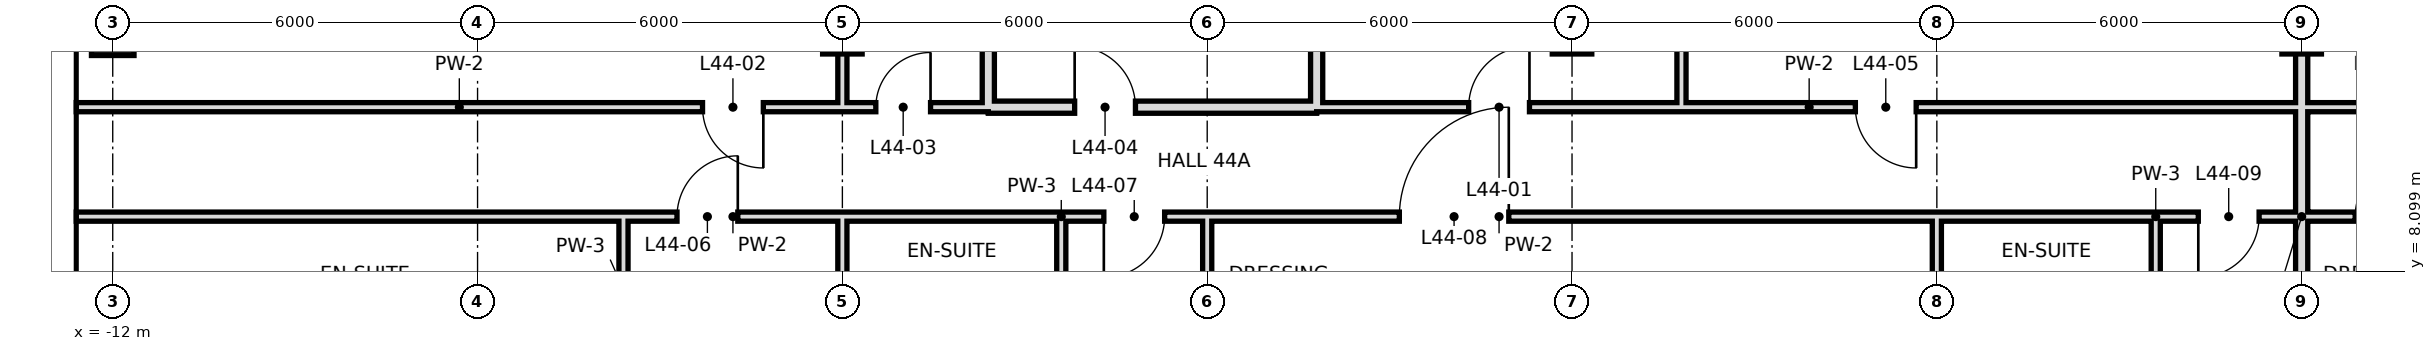
"""IFC4 building model, lengths in metres.
Left out: names, types, materials, properties, quantities, classifications, styles, units other than length and angle.
Written with IfcOpenShell. Run it as: python <this file> out.ifc"""

import sys

from ifc_helpers import new_model, si_unit, direction, frame, frame_2d, origin, origin_2d, place, context, subcontext, project, spatial, rectangle, hollow_rectangle, extrude, element, fill, save


model = new_model("IFC4")
c1 = context("Model", 3, precision=1e-05, world=origin(), true_north=direction((0.0, 1.0)))
c2 = subcontext(c1, "Body", "Model", "MODEL_VIEW")
j1 = project(units=[si_unit("LENGTHUNIT", "METRE"), si_unit("PLANEANGLEUNIT", "RADIAN")], contexts=[c1])
p1 = place(None, origin())
s1 = spatial("IfcSite", under=j1, at=p1, CompositionType="ELEMENT")
p2 = place(p1, origin())
s2 = spatial("IfcBuilding", under=s1, at=p2, CompositionType="ELEMENT")
p3 = place(p2, frame((0.0, 0.0, 192.0)))
s3 = spatial("IfcBuildingStorey", under=s2, at=p3, CompositionType="ELEMENT", Elevation=192.0)
p4 = place(p3, frame((-12.0, 12.0, -0.3), z_axis=(0.0, 0.0, 1.0), x_axis=(1.0, 0.0, 0.0)))
e1 = element("IfcColumn", 1, at=p4, inside=s3, PredefinedType="COLUMN", context=c2, shape_type="SweptSolid", body=[
    extrude(hollow_rectangle(XDim=0.7, YDim=0.7, WallThickness=0.036, at=origin_2d()), origin(), (0.0, 0.0, 1.0), 3.9),
])
for number, where, z_axis, x_axis in (
    (2, (0.0, 12.0, 0.0), (0.0, 0.0, 1.0), (1.0, 0.0, 0.0)),
    (3, (12.0, 12.0, 0.0), (0.0, 0.0, 1.0), (1.0, 0.0, 0.0)),
    (4, (24.0, 12.0, 0.0), (0.0, 0.0, 1.0), (1.0, 0.0, 0.0)),
):
    element("IfcColumn", number, at=place(p3, frame(where, z_axis=z_axis, x_axis=x_axis)), inside=s3, PredefinedType="COLUMN", context=c2, shape_type="SweptSolid", body=[
        extrude(hollow_rectangle(XDim=0.65, YDim=0.65, WallThickness=0.032, at=origin_2d()), origin(), (0.0, 0.0, 1.0), 3.6),
    ])
p5 = place(p3, frame((-3.6, 6.0, 0.0), z_axis=(0.0, 0.0, 1.0), x_axis=(0.0, 1.0, 0.0)))
e5 = element("IfcWall", 5, at=p5, inside=s3, PredefinedType="PARTITIONING", context=c2, shape_type="SweptSolid", body=[
    extrude(rectangle(XDim=3.0, YDim=0.15, at=frame_2d((1.5, 0.0))), origin(), (0.0, 0.0, 1.0), 3.42),
])
p6 = place(p3, frame((0.0, 6.0, 0.0), z_axis=(0.0, 0.0, 1.0), x_axis=(0.0, 1.0, 0.0)))
e6 = element("IfcWall", 6, at=p6, inside=s3, PredefinedType="PARTITIONING", context=c2, shape_type="SweptSolid", body=[
    extrude(rectangle(XDim=3.0, YDim=0.15, at=frame_2d((1.5, 0.0))), origin(), (0.0, 0.0, 1.0), 2.72),
])
p7 = place(p3, frame((0.0, 10.8, 0.0), z_axis=(0.0, 0.0, 1.0), x_axis=(0.0, 1.0, 0.0)))
e7 = element("IfcWall", 7, at=p7, inside=s3, PredefinedType="PARTITIONING", context=c2, shape_type="SweptSolid", body=[
    extrude(rectangle(XDim=7.2, YDim=0.15, at=frame_2d((3.6, 0.0))), origin(), (0.0, 0.0, 1.0), 2.72),
])
p8 = place(p3, frame((13.8, 10.8, 0.0), z_axis=(0.0, 0.0, 1.0), x_axis=(0.0, 1.0, 0.0)))
e8 = element("IfcWall", 8, at=p8, inside=s3, PredefinedType="PARTITIONING", context=c2, shape_type="SweptSolid", body=[
    extrude(rectangle(XDim=4.5, YDim=0.15, at=frame_2d((2.25, 0.0))), origin(), (0.0, 0.0, 1.0), 3.42),
])
p9 = place(p3, frame((18.0, 6.0, 0.0), z_axis=(0.0, 0.0, 1.0), x_axis=(0.0, 1.0, 0.0)))
e9 = element("IfcWall", 9, at=p9, inside=s3, PredefinedType="PARTITIONING", context=c2, shape_type="SweptSolid", body=[
    extrude(rectangle(XDim=3.0, YDim=0.15, at=frame_2d((1.5, 0.0))), origin(), (0.0, 0.0, 1.0), 2.72),
])
p10 = place(p3, frame((2.4, 10.8, 0.0), z_axis=(0.0, 0.0, 1.0), x_axis=(0.0, 1.0, 0.0)))
e10 = element("IfcWall", 10, at=p10, inside=s3, PredefinedType="SOLIDWALL", context=c2, shape_type="SweptSolid", body=[
    extrude(rectangle(XDim=7.2, YDim=0.2, at=frame_2d((3.6, 0.0))), origin(), (0.0, 0.0, 1.0), 2.72),
])
p11 = place(p3, frame((21.6, 6.0, 0.0), z_axis=(0.0, 0.0, 1.0), x_axis=(0.0, 1.0, 0.0)))
e11 = element("IfcWall", 11, at=p11, inside=s3, PredefinedType="PARTITIONING", context=c2, shape_type="SweptSolid", body=[
    extrude(rectangle(XDim=3.0, YDim=0.15, at=frame_2d((1.5, 0.0))), origin(), (0.0, 0.0, 1.0), 3.42),
])
p12 = place(p3, frame((24.0, 0.0, 0.0), z_axis=(0.0, 0.0, 1.0), x_axis=(0.0, 1.0, 0.0)))
e12 = element("IfcWall", 12, at=p12, inside=s3, PredefinedType="SOLIDWALL", context=c2, shape_type="SweptSolid", body=[
    extrude(rectangle(XDim=15.3, YDim=0.2, at=frame_2d((7.65, 0.0))), origin(), (0.0, 0.0, 1.0), 2.72),
])
p13 = place(p3, frame((3.6, 6.0, 0.0), z_axis=(0.0, 0.0, 1.0), x_axis=(0.0, 1.0, 0.0)))
e13 = element("IfcWall", 13, at=p13, inside=s3, PredefinedType="PARTITIONING", context=c2, shape_type="SweptSolid", body=[
    extrude(rectangle(XDim=3.0, YDim=0.15, at=frame_2d((1.5, 0.0))), origin(), (0.0, 0.0, 1.0), 3.42),
])
p14 = place(p3, frame((6.0, -0.6, 0.0), z_axis=(0.0, 0.0, 1.0), x_axis=(0.0, 1.0, 0.0)))
e14 = element("IfcWall", 14, at=p14, inside=s3, PredefinedType="PARTITIONING", context=c2, shape_type="SweptSolid", body=[
    extrude(rectangle(XDim=9.6, YDim=0.15, at=frame_2d((4.8, 0.0))), origin(), (0.0, 0.0, 1.0), 2.72),
])
p15 = place(p3, frame((7.8, 10.8, 0.0), z_axis=(0.0, 0.0, 1.0), x_axis=(0.0, 1.0, 0.0)))
e15 = element("IfcWall", 15, at=p15, inside=s3, PredefinedType="SOLIDWALL", context=c2, shape_type="SweptSolid", body=[
    extrude(rectangle(XDim=4.5, YDim=0.2, at=frame_2d((2.25, 0.0))), origin(), (0.0, 0.0, 1.0), 2.72),
])
p16 = place(p3, frame((2.4, 10.8, 0.0), z_axis=(0.0, 0.0, 1.0), x_axis=(1.0, 0.0, 0.0)))
e16 = element("IfcWall", 16, at=p16, inside=s3, PredefinedType="SOLIDWALL", context=c2, shape_type="SweptSolid", body=[
    extrude(rectangle(XDim=5.4, YDim=0.2, at=frame_2d((2.7, 0.0))), origin(), (0.0, 0.0, 1.0), 2.72),
])
p17 = place(p16, frame((1.42, 0.0, 0.0)))
e17 = element("IfcOpeningElement", 17, at=p17, cuts=e16, PredefinedType="OPENING", context=c2, shape_type="SweptSolid", body=[
    extrude(rectangle(XDim=1.0, YDim=2.4, at=frame_2d((0.5, 1.2))), frame((0.0, 0.11, 0.0), z_axis=(0.0, -1.0, 0.0), x_axis=(1.0, 0.0, 0.0)), (0.0, 0.0, 1.0), 0.22),
])
p18 = place(p3, frame((-12.6, 10.8, 0.0), z_axis=(0.0, 0.0, 1.0), x_axis=(1.0, 0.0, 0.0)))
e18 = element("IfcWall", 18, at=p18, inside=s3, PredefinedType="PARTITIONING", context=c2, shape_type="SweptSolid", body=[
    extrude(rectangle(XDim=12.6, YDim=0.15, at=frame_2d((6.3, 0.0))), origin(), (0.0, 0.0, 1.0), 3.42),
])
p19 = place(p18, frame((10.3, 0.0, 0.0)))
e19 = element("IfcOpeningElement", 19, at=p19, cuts=e18, PredefinedType="OPENING", context=c2, shape_type="SweptSolid", body=[
    extrude(rectangle(XDim=1.0, YDim=2.4, at=frame_2d((0.5, 1.2))), frame((0.0, 0.085, 0.0), z_axis=(0.0, -1.0, 0.0), x_axis=(1.0, 0.0, 0.0)), (0.0, 0.0, 1.0), 0.17),
])
p20 = place(p3, frame((7.8, 10.8, 0.0), z_axis=(0.0, 0.0, 1.0), x_axis=(1.0, 0.0, 0.0)))
e20 = element("IfcWall", 20, at=p20, inside=s3, PredefinedType="PARTITIONING", context=c2, shape_type="SweptSolid", body=[
    extrude(rectangle(XDim=16.2, YDim=0.15, at=frame_2d((8.1, 0.0))), origin(), (0.0, 0.0, 1.0), 3.42),
])
p21 = place(p20, frame((2.5, 0.0, 0.0)))
e21 = element("IfcOpeningElement", 21, at=p21, cuts=e20, PredefinedType="OPENING", context=c2, shape_type="SweptSolid", body=[
    extrude(rectangle(XDim=1.0, YDim=2.4, at=frame_2d((0.5, 1.2))), frame((0.0, 0.085, 0.0), z_axis=(0.0, -1.0, 0.0), x_axis=(1.0, 0.0, 0.0)), (0.0, 0.0, 1.0), 0.17),
])
p22 = place(p20, frame((8.86, 0.0, 0.0)))
e22 = element("IfcOpeningElement", 22, at=p22, cuts=e20, PredefinedType="OPENING", context=c2, shape_type="SweptSolid", body=[
    extrude(rectangle(XDim=1.0, YDim=2.4, at=frame_2d((0.5, 1.2))), frame((0.0, 0.085, 0.0), z_axis=(0.0, -1.0, 0.0), x_axis=(1.0, 0.0, 0.0)), (0.0, 0.0, 1.0), 0.17),
])
p23 = place(p3, frame((0.0, 10.8, 0.0), z_axis=(0.0, 0.0, 1.0), x_axis=(1.0, 0.0, 0.0)))
e23 = element("IfcWall", 23, at=p23, inside=s3, PredefinedType="PARTITIONING", context=c2, shape_type="SweptSolid", body=[
    extrude(rectangle(XDim=2.4, YDim=0.15, at=frame_2d((1.2, 0.0))), origin(), (0.0, 0.0, 1.0), 3.42),
])
p24 = place(p23, frame((0.55, 0.0, 0.0)))
e24 = element("IfcOpeningElement", 24, at=p24, cuts=e23, PredefinedType="OPENING", context=c2, shape_type="SweptSolid", body=[
    extrude(rectangle(XDim=0.9, YDim=2.4, at=frame_2d((0.45, 1.2))), frame((0.0, 0.085, 0.0), z_axis=(0.0, -1.0, 0.0), x_axis=(1.0, 0.0, 0.0)), (0.0, 0.0, 1.0), 0.17),
])
p25 = place(p3, frame((24.0, 10.8, 0.0), z_axis=(0.0, 0.0, 1.0), x_axis=(1.0, 0.0, 0.0)))
e25 = element("IfcWall", 25, at=p25, inside=s3, PredefinedType="PARTITIONING", context=c2, shape_type="SweptSolid", body=[
    extrude(rectangle(XDim=2.4, YDim=0.15, at=frame_2d((1.2, 0.0))), origin(), (0.0, 0.0, 1.0), 3.42),
])
p26 = place(p25, frame((0.95, 0.0, 0.0)))
e26 = element("IfcOpeningElement", 26, at=p26, cuts=e25, PredefinedType="OPENING", context=c2, shape_type="SweptSolid", body=[
    extrude(rectangle(XDim=0.9, YDim=2.4, at=frame_2d((0.45, 1.2))), frame((0.0, 0.085, 0.0), z_axis=(0.0, -1.0, 0.0), x_axis=(1.0, 0.0, 0.0)), (0.0, 0.0, 1.0), 0.17),
])
p27 = place(p3, frame((-3.6, 9.0, 0.0), z_axis=(0.0, 0.0, 1.0), x_axis=(1.0, 0.0, 0.0)))
e27 = element("IfcWall", 27, at=p27, inside=s3, PredefinedType="PARTITIONING", context=c2, shape_type="SweptSolid", body=[
    extrude(rectangle(XDim=3.6, YDim=0.15, at=frame_2d((1.8, 0.0))), origin(), (0.0, 0.0, 1.0), 3.42),
])
p28 = place(p27, frame((0.88, 0.0, 0.0)))
e28 = element("IfcOpeningElement", 28, at=p28, cuts=e27, PredefinedType="OPENING", context=c2, shape_type="SweptSolid", body=[
    extrude(rectangle(XDim=1.0, YDim=2.4, at=frame_2d((0.5, 1.2))), frame((0.0, 0.085, 0.0), z_axis=(0.0, -1.0, 0.0), x_axis=(1.0, 0.0, 0.0)), (0.0, 0.0, 1.0), 0.17),
])
p29 = place(p3, frame((3.6, 9.0, 0.0), z_axis=(0.0, 0.0, 1.0), x_axis=(1.0, 0.0, 0.0)))
e29 = element("IfcWall", 29, at=p29, inside=s3, PredefinedType="PARTITIONING", context=c2, shape_type="SweptSolid", body=[
    extrude(rectangle(XDim=14.4, YDim=0.15, at=frame_2d((7.2, 0.0))), origin(), (0.0, 0.0, 1.0), 3.42),
])
p30 = place(p29, frame((0.7, 0.0, 0.0)))
e30 = element("IfcOpeningElement", 30, at=p30, cuts=e29, PredefinedType="OPENING", context=c2, shape_type="SweptSolid", body=[
    extrude(rectangle(XDim=1.0, YDim=2.4, at=frame_2d((0.5, 1.2))), frame((0.0, 0.085, 0.0), z_axis=(0.0, -1.0, 0.0), x_axis=(1.0, 0.0, 0.0)), (0.0, 0.0, 1.0), 0.17),
])
p31 = place(p29, frame((5.56, 0.0, 0.0)))
e31 = element("IfcOpeningElement", 31, at=p31, cuts=e29, PredefinedType="OPENING", context=c2, shape_type="SweptSolid", body=[
    extrude(rectangle(XDim=1.8, YDim=2.4, at=frame_2d((0.9, 1.2))), frame((0.0, 0.085, 0.0), z_axis=(0.0, -1.0, 0.0), x_axis=(1.0, 0.0, 0.0)), (0.0, 0.0, 1.0), 0.17),
])
p32 = place(p3, frame((21.6, 9.0, 0.0), z_axis=(0.0, 0.0, 1.0), x_axis=(1.0, 0.0, 0.0)))
e32 = element("IfcWall", 32, at=p32, inside=s3, PredefinedType="PARTITIONING", context=c2, shape_type="SweptSolid", body=[
    extrude(rectangle(XDim=4.8, YDim=0.15, at=frame_2d((2.4, 0.0))), origin(), (0.0, 0.0, 1.0), 3.42),
])
p33 = place(p32, frame((0.7, 0.0, 0.0)))
e33 = element("IfcOpeningElement", 33, at=p33, cuts=e32, PredefinedType="OPENING", context=c2, shape_type="SweptSolid", body=[
    extrude(rectangle(XDim=1.0, YDim=2.4, at=frame_2d((0.5, 1.2))), frame((0.0, 0.085, 0.0), z_axis=(0.0, -1.0, 0.0), x_axis=(1.0, 0.0, 0.0)), (0.0, 0.0, 1.0), 0.17),
])
p34 = place(p32, frame((3.28, 0.0, 0.0)))
e34 = element("IfcOpeningElement", 34, at=p34, cuts=e32, PredefinedType="OPENING", context=c2, shape_type="SweptSolid", body=[
    extrude(rectangle(XDim=1.0, YDim=2.4, at=frame_2d((0.5, 1.2))), frame((0.0, 0.085, 0.0), z_axis=(0.0, -1.0, 0.0), x_axis=(1.0, 0.0, 0.0)), (0.0, 0.0, 1.0), 0.17),
])
p35 = place(p3, frame((-12.6, 9.0, 0.0), z_axis=(0.0, 0.0, 1.0), x_axis=(1.0, 0.0, 0.0)))
e35 = element("IfcWall", 35, at=p35, inside=s3, PredefinedType="PARTITIONING", context=c2, shape_type="SweptSolid", body=[
    extrude(rectangle(XDim=9.0, YDim=0.15, at=frame_2d((4.5, 0.0))), origin(), (0.0, 0.0, 1.0), 3.42),
])
for number, where, z_axis, x_axis in (
    (36, (0.0, 9.0, 0.0), (0.0, 0.0, 1.0), (1.0, 0.0, 0.0)),
    (37, (18.0, 9.0, 0.0), (0.0, 0.0, 1.0), (1.0, 0.0, 0.0)),
):
    element("IfcWall", number, at=place(p3, frame(where, z_axis=z_axis, x_axis=x_axis)), inside=s3, PredefinedType="PARTITIONING", context=c2, shape_type="SweptSolid", body=[
        extrude(rectangle(XDim=3.6, YDim=0.15, at=frame_2d((1.8, 0.0))), origin(), (0.0, 0.0, 1.0), 3.42),
    ])
p36 = place(p21, frame((1.0, 0.0, 0.0), z_axis=(0.0, 0.0, 1.0), x_axis=(-1.0, 0.0, 0.0)))
e38 = element("IfcDoor", 38, at=p36, inside=s3, OperationType="SINGLE_SWING_LEFT", PredefinedType="DOOR", context=c2, shape_type="SweptSolid", body=[
    extrude(rectangle(XDim=1.0, YDim=2.4, at=frame_2d((0.5, 1.2))), frame((0.0, 0.025, 0.0), z_axis=(0.0, -1.0, 0.0), x_axis=(1.0, 0.0, 0.0)), (0.0, 0.0, 1.0), 0.05),
])
fill(e21, e38)
p37 = place(p19, origin())
e39 = element("IfcDoor", 39, at=p37, inside=s3, OperationType="SINGLE_SWING_RIGHT", PredefinedType="DOOR", context=c2, shape_type="SweptSolid", body=[
    extrude(rectangle(XDim=1.0, YDim=2.4, at=frame_2d((0.5, 1.2))), frame((0.0, 0.025, 0.0), z_axis=(0.0, -1.0, 0.0), x_axis=(1.0, 0.0, 0.0)), (0.0, 0.0, 1.0), 0.05),
])
fill(e19, e39)
p38 = place(p24, frame((0.9, 0.0, 0.0), z_axis=(0.0, 0.0, 1.0), x_axis=(-1.0, 0.0, 0.0)))
e40 = element("IfcDoor", 40, at=p38, inside=s3, OperationType="SINGLE_SWING_LEFT", PredefinedType="DOOR", context=c2, shape_type="SweptSolid", body=[
    extrude(rectangle(XDim=0.9, YDim=2.4, at=frame_2d((0.45, 1.2))), frame((0.0, 0.025, 0.0), z_axis=(0.0, -1.0, 0.0), x_axis=(1.0, 0.0, 0.0)), (0.0, 0.0, 1.0), 0.05),
])
fill(e24, e40)
p39 = place(p17, origin())
e41 = element("IfcDoor", 41, at=p39, inside=s3, OperationType="SINGLE_SWING_LEFT", PredefinedType="DOOR", context=c2, shape_type="SweptSolid", body=[
    extrude(rectangle(XDim=1.0, YDim=2.4, at=frame_2d((0.5, 1.2))), frame((0.0, 0.025, 0.0), z_axis=(0.0, -1.0, 0.0), x_axis=(1.0, 0.0, 0.0)), (0.0, 0.0, 1.0), 0.05),
])
fill(e17, e41)
p40 = place(p22, origin())
e42 = element("IfcDoor", 42, at=p40, inside=s3, OperationType="SINGLE_SWING_RIGHT", PredefinedType="DOOR", context=c2, shape_type="SweptSolid", body=[
    extrude(rectangle(XDim=1.0, YDim=2.4, at=frame_2d((0.5, 1.2))), frame((0.0, 0.025, 0.0), z_axis=(0.0, -1.0, 0.0), x_axis=(1.0, 0.0, 0.0)), (0.0, 0.0, 1.0), 0.05),
])
fill(e22, e42)
p41 = place(p28, frame((1.0, 0.0, 0.0), z_axis=(0.0, 0.0, 1.0), x_axis=(-1.0, 0.0, 0.0)))
e43 = element("IfcDoor", 43, at=p41, inside=s3, OperationType="SINGLE_SWING_LEFT", PredefinedType="DOOR", context=c2, shape_type="SweptSolid", body=[
    extrude(rectangle(XDim=1.0, YDim=2.4, at=frame_2d((0.5, 1.2))), frame((0.0, 0.025, 0.0), z_axis=(0.0, -1.0, 0.0), x_axis=(1.0, 0.0, 0.0)), (0.0, 0.0, 1.0), 0.05),
])
fill(e28, e43)
p42 = place(p30, frame((1.0, 0.0, 0.0), z_axis=(0.0, 0.0, 1.0), x_axis=(-1.0, 0.0, 0.0)))
e44 = element("IfcDoor", 44, at=p42, inside=s3, OperationType="SINGLE_SWING_RIGHT", PredefinedType="DOOR", context=c2, shape_type="SweptSolid", body=[
    extrude(rectangle(XDim=1.0, YDim=2.4, at=frame_2d((0.5, 1.2))), frame((0.0, 0.025, 0.0), z_axis=(0.0, -1.0, 0.0), x_axis=(1.0, 0.0, 0.0)), (0.0, 0.0, 1.0), 0.05),
])
fill(e30, e44)
p43 = place(p31, frame((1.8, 0.0, 0.0), z_axis=(0.0, 0.0, 1.0), x_axis=(-1.0, 0.0, 0.0)))
e45 = element("IfcDoor", 45, at=p43, inside=s3, OperationType="SINGLE_SWING_LEFT", PredefinedType="DOOR", context=c2, shape_type="SweptSolid", body=[
    extrude(rectangle(XDim=1.8, YDim=2.4, at=frame_2d((0.9, 1.2))), frame((0.0, 0.025, 0.0), z_axis=(0.0, -1.0, 0.0), x_axis=(1.0, 0.0, 0.0)), (0.0, 0.0, 1.0), 0.05),
])
fill(e31, e45)
p44 = place(p33, frame((1.0, 0.0, 0.0), z_axis=(0.0, 0.0, 1.0), x_axis=(-1.0, 0.0, 0.0)))
e46 = element("IfcDoor", 46, at=p44, inside=s3, OperationType="SINGLE_SWING_RIGHT", PredefinedType="DOOR", context=c2, shape_type="SweptSolid", body=[
    extrude(rectangle(XDim=1.0, YDim=2.4, at=frame_2d((0.5, 1.2))), frame((0.0, 0.025, 0.0), z_axis=(0.0, -1.0, 0.0), x_axis=(1.0, 0.0, 0.0)), (0.0, 0.0, 1.0), 0.05),
])
fill(e33, e46)
p45 = place(p34, frame((1.0, 0.0, 0.0), z_axis=(0.0, 0.0, 1.0), x_axis=(-1.0, 0.0, 0.0)))
e47 = element("IfcDoor", 47, at=p45, inside=s3, OperationType="SINGLE_SWING_LEFT", PredefinedType="DOOR", context=c2, shape_type="SweptSolid", body=[
    extrude(rectangle(XDim=1.0, YDim=2.4, at=frame_2d((0.5, 1.2))), frame((0.0, 0.025, 0.0), z_axis=(0.0, -1.0, 0.0), x_axis=(1.0, 0.0, 0.0)), (0.0, 0.0, 1.0), 0.05),
])
fill(e34, e47)
save(model, sys.argv[1])
